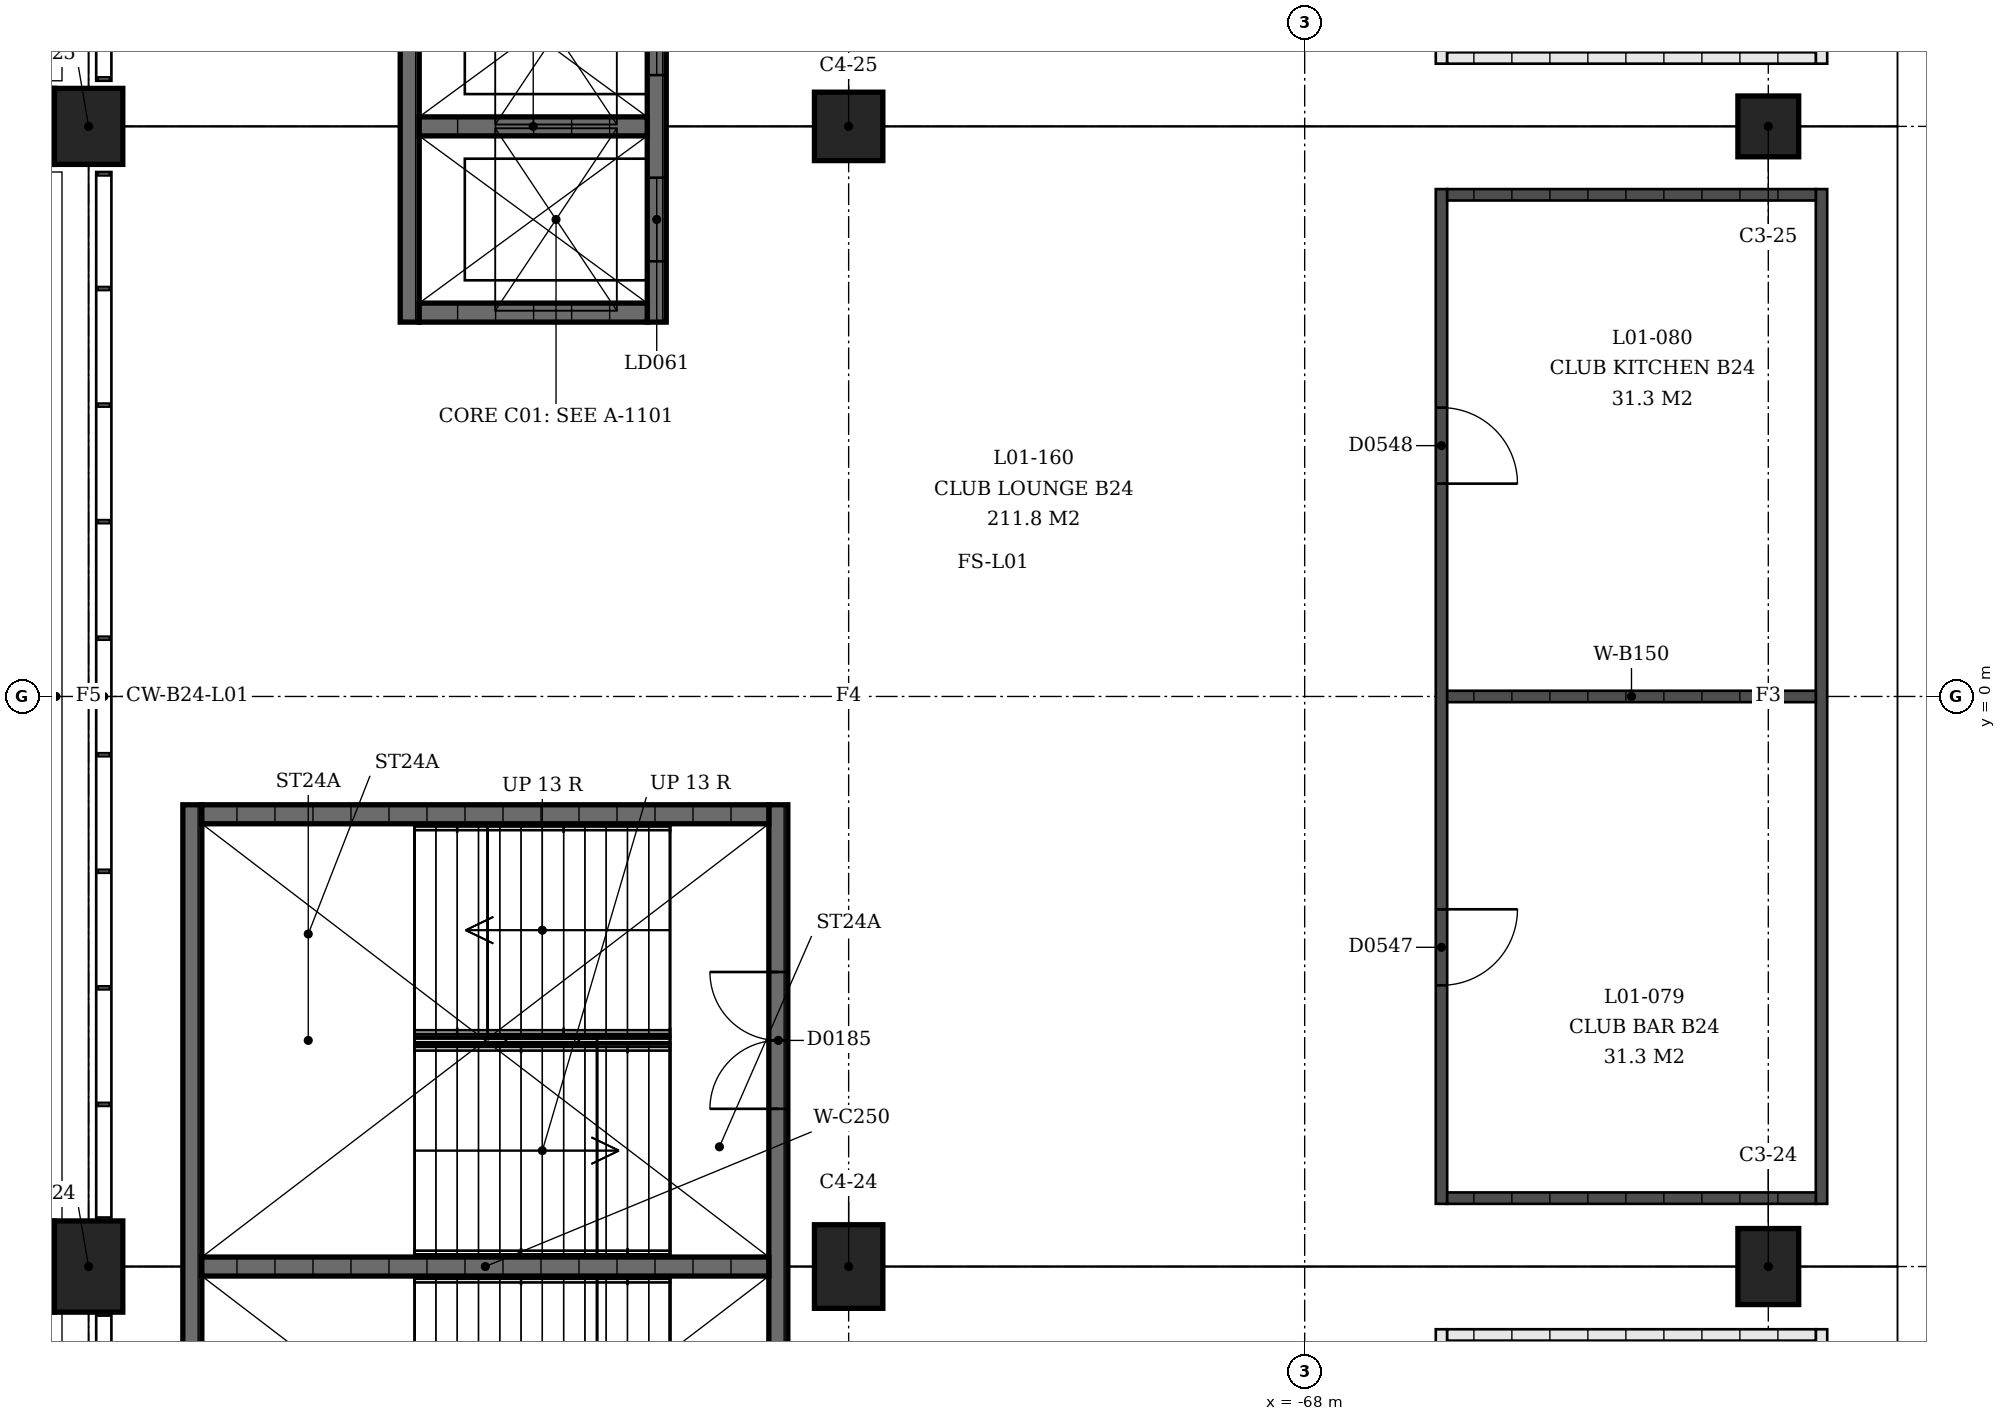
"""IFC4 building model, lengths in metres.
Left out: names, types, materials, properties, quantities, classifications, styles, units other than length and angle.
Written with IfcOpenShell. Run it as: python <this file> out.ifc"""

import sys

from ifc_helpers import new_model, si_unit, direction, frame, frame_2d, origin, origin_2d, place, context, subcontext, project, spatial, rectangle, extrude, element, fill, save


model = new_model("IFC4")
c1 = context("Model", 3, precision=1e-05, world=origin(), true_north=direction((0.0, 1.0)))
c2 = subcontext(c1, "Body", "Model", "MODEL_VIEW")
j1 = project(units=[si_unit("LENGTHUNIT", "METRE"), si_unit("PLANEANGLEUNIT", "RADIAN")], contexts=[c1])
p1 = place(None, origin())
s1 = spatial("IfcSite", under=j1, at=p1, CompositionType="ELEMENT")
p2 = place(p1, origin())
s2 = spatial("IfcBuilding", under=s1, at=p2, CompositionType="ELEMENT")
p3 = place(p2, frame((0.0, 0.0, 4.5)))
s3 = spatial("IfcBuildingStorey", under=s2, at=p3, CompositionType="ELEMENT", Elevation=4.5)
p4 = place(p3, frame((-61.9, -7.5, 0.0), z_axis=(0.0, 0.0, 1.0), x_axis=(0.0, -1.0, 0.0)))
e1 = element("IfcColumn", 1, at=p4, inside=s3, PredefinedType="COLUMN", context=c2, shape_type="SweptSolid", body=[
    extrude(rectangle(XDim=1.0, YDim=0.8, at=origin_2d()), origin(), (0.0, 0.0, 1.0), 4.5),
])
p5 = place(p3, frame((-74.0, -7.5, 0.0), z_axis=(0.0, 0.0, 1.0), x_axis=(0.0, -1.0, 0.0)))
e2 = element("IfcColumn", 2, at=p5, inside=s3, PredefinedType="COLUMN", context=c2, shape_type="SweptSolid", body=[
    extrude(rectangle(XDim=1.1, YDim=0.9, at=origin_2d()), origin(), (0.0, 0.0, 1.0), 4.5),
])
p6 = place(p3, frame((-84.0, -7.5, 0.0), z_axis=(0.0, 0.0, 1.0), x_axis=(0.0, -1.0, 0.0)))
e3 = element("IfcColumn", 3, at=p6, inside=s3, PredefinedType="COLUMN", context=c2, shape_type="SweptSolid", body=[
    extrude(rectangle(XDim=1.2, YDim=0.9, at=origin_2d()), origin(), (0.0, 0.0, 1.0), 4.5),
])
p7 = place(p3, frame((-61.9, 7.5, 0.0), z_axis=(0.0, 0.0, 1.0), x_axis=(0.0, -1.0, 0.0)))
e4 = element("IfcColumn", 4, at=p7, inside=s3, PredefinedType="COLUMN", context=c2, shape_type="SweptSolid", body=[
    extrude(rectangle(XDim=0.8, YDim=0.8, at=origin_2d()), origin(), (0.0, 0.0, 1.0), 4.5),
])
p8 = place(p3, frame((-74.0, 7.5, 0.0), z_axis=(0.0, 0.0, 1.0), x_axis=(0.0, -1.0, 0.0)))
e5 = element("IfcColumn", 5, at=p8, inside=s3, PredefinedType="COLUMN", context=c2, shape_type="SweptSolid", body=[
    extrude(rectangle(XDim=0.9, YDim=0.9, at=origin_2d()), origin(), (0.0, 0.0, 1.0), 4.5),
])
p9 = place(p3, frame((-84.0, 7.5, 0.0), z_axis=(0.0, 0.0, 1.0), x_axis=(0.0, -1.0, 0.0)))
e6 = element("IfcColumn", 6, at=p9, inside=s3, PredefinedType="COLUMN", context=c2, shape_type="SweptSolid", body=[
    extrude(rectangle(XDim=1.0, YDim=0.9, at=origin_2d()), origin(), (0.0, 0.0, 1.0), 4.5),
])
p10 = place(p3, frame((-74.925, -1.425, 0.0), z_axis=(0.0, 0.0, 1.0), x_axis=(0.0, -1.0, 0.0)))
e7 = element("IfcWall", 7, at=p10, inside=s3, PredefinedType="SHEAR", context=c2, shape_type="SweptSolid", body=[
    extrude(rectangle(XDim=12.15, YDim=0.25, at=frame_2d((6.075, 0.0))), origin(), (0.0, 0.0, 1.0), 4.09),
])
p11 = place(p10, frame((2.2, 0.0, 0.0)))
e8 = element("IfcOpeningElement", 8, at=p11, cuts=e7, PredefinedType="OPENING", context=c2, shape_type="SweptSolid", body=[
    extrude(rectangle(XDim=1.8, YDim=2.1, at=frame_2d((0.9, 1.05))), frame((0.0, 0.125, 0.0), z_axis=(0.0, -1.0, 0.0), x_axis=(1.0, 0.0, 0.0)), (0.0, 0.0, 1.0), 0.25),
])
p12 = place(p10, frame((8.15, 0.0, 0.0)))
e9 = element("IfcOpeningElement", 9, at=p12, cuts=e7, PredefinedType="OPENING", context=c2, shape_type="SweptSolid", body=[
    extrude(rectangle(XDim=1.8, YDim=2.1, at=frame_2d((0.9, 1.05))), frame((0.0, 0.125, 0.0), z_axis=(0.0, -1.0, 0.0), x_axis=(1.0, 0.0, 0.0)), (0.0, 0.0, 1.0), 0.25),
])
p13 = place(p3, frame((-82.635, -1.425, 0.0), z_axis=(0.0, 0.0, 1.0), x_axis=(0.0, -1.0, 0.0)))
e10 = element("IfcWall", 10, at=p13, inside=s3, PredefinedType="SHEAR", context=c2, shape_type="SweptSolid", body=[
    extrude(rectangle(XDim=12.15, YDim=0.25, at=frame_2d((6.075, 0.0))), origin(), (0.0, 0.0, 1.0), 4.09),
])
for number, where, z_axis, x_axis in (
    (11, (-75.05, -1.55, 0.0), (0.0, 0.0, 1.0), (-1.0, 0.0, 0.0)),
    (12, (-75.05, -7.5, 0.0), (0.0, 0.0, 1.0), (-1.0, 0.0, 0.0)),
):
    element("IfcWall", number, at=place(p3, frame(where, z_axis=z_axis, x_axis=x_axis)), inside=s3, PredefinedType="SHEAR", context=c2, shape_type="SweptSolid", body=[
        extrude(rectangle(XDim=7.46, YDim=0.25, at=frame_2d((3.73, 0.0))), origin(), (0.0, 0.0, 1.0), 4.09),
    ])
p14 = place(p3, frame((-76.525, 10.075, 0.0), z_axis=(0.0, 0.0, 1.0), x_axis=(0.0, -1.0, 0.0)))
e13 = element("IfcWall", 13, at=p14, inside=s3, PredefinedType="SHEAR", context=c2, shape_type="SweptSolid", body=[
    extrude(rectangle(XDim=5.15, YDim=0.25, at=frame_2d((2.575, 0.0))), origin(), (0.0, 0.0, 1.0), 4.09),
])
p15 = place(p14, frame((0.8, 0.0, 0.0)))
e14 = element("IfcOpeningElement", 14, at=p15, cuts=e13, PredefinedType="OPENING", context=c2, shape_type="SweptSolid", body=[
    extrude(rectangle(XDim=1.1, YDim=2.1, at=frame_2d((0.55, 1.05))), frame((0.0, 0.125, 0.0), z_axis=(0.0, -1.0, 0.0), x_axis=(1.0, 0.0, 0.0)), (0.0, 0.0, 1.0), 0.25),
])
p16 = place(p14, frame((3.25, 0.0, 0.0)))
e15 = element("IfcOpeningElement", 15, at=p16, cuts=e13, PredefinedType="OPENING", context=c2, shape_type="SweptSolid", body=[
    extrude(rectangle(XDim=1.1, YDim=2.1, at=frame_2d((0.55, 1.05))), frame((0.0, 0.125, 0.0), z_axis=(0.0, -1.0, 0.0), x_axis=(1.0, 0.0, 0.0)), (0.0, 0.0, 1.0), 0.25),
])
p17 = place(p3, frame((-79.775, 10.075, 0.0), z_axis=(0.0, 0.0, 1.0), x_axis=(0.0, -1.0, 0.0)))
e16 = element("IfcWall", 16, at=p17, inside=s3, PredefinedType="SHEAR", context=c2, shape_type="SweptSolid", body=[
    extrude(rectangle(XDim=5.15, YDim=0.25, at=frame_2d((2.575, 0.0))), origin(), (0.0, 0.0, 1.0), 4.09),
])
for number, where, z_axis, x_axis in (
    (17, (-76.65, 5.05, 0.0), (0.0, 0.0, 1.0), (-1.0, 0.0, 0.0)),
    (18, (-76.65, 7.5, 0.0), (0.0, 0.0, 1.0), (-1.0, 0.0, 0.0)),
):
    element("IfcWall", number, at=place(p3, frame(where, z_axis=z_axis, x_axis=x_axis)), inside=s3, PredefinedType="SHEAR", context=c2, shape_type="SweptSolid", body=[
        extrude(rectangle(XDim=3.0, YDim=0.25, at=frame_2d((1.5, 0.0))), origin(), (0.0, 0.0, 1.0), 4.09),
    ])
p18 = place(p3, frame((-61.2, -8.325, 0.0), z_axis=(0.0, 0.0, 1.0), x_axis=(0.0, -1.0, 0.0)))
e19 = element("IfcWall", 19, at=p18, inside=s3, PredefinedType="PARTITIONING", context=c2, shape_type="SweptSolid", body=[
    extrude(rectangle(XDim=13.35, YDim=0.15, at=frame_2d((6.675, 0.0))), origin(), (0.0, 0.0, 1.0), 3.0),
])
p19 = place(p3, frame((-66.2, -8.325, 0.0), z_axis=(0.0, 0.0, 1.0), x_axis=(0.0, -1.0, 0.0)))
e20 = element("IfcWall", 20, at=p19, inside=s3, PredefinedType="PARTITIONING", context=c2, shape_type="SweptSolid", body=[
    extrude(rectangle(XDim=13.35, YDim=0.15, at=frame_2d((6.675, 0.0))), origin(), (0.0, 0.0, 1.0), 3.0),
])
p20 = place(p19, frame((1.671, 0.0, 0.0)))
e21 = element("IfcOpeningElement", 21, at=p20, cuts=e20, PredefinedType="OPENING", context=c2, shape_type="SweptSolid", body=[
    extrude(rectangle(XDim=0.9, YDim=2.1, at=frame_2d((0.45, 1.05))), frame((0.0, 0.075, 0.0), z_axis=(0.0, -1.0, 0.0), x_axis=(1.0, 0.0, 0.0)), (0.0, 0.0, 1.0), 0.15),
])
p21 = place(p19, frame((5.763, 0.0, 0.0)))
e22 = element("IfcOpeningElement", 22, at=p21, cuts=e20, PredefinedType="OPENING", context=c2, shape_type="SweptSolid", body=[
    extrude(rectangle(XDim=0.9, YDim=2.1, at=frame_2d((0.45, 1.05))), frame((0.0, 0.075, 0.0), z_axis=(0.0, -1.0, 0.0), x_axis=(1.0, 0.0, 0.0)), (0.0, 0.0, 1.0), 0.15),
])
p22 = place(p19, frame((8.963, 0.0, 0.0)))
e23 = element("IfcOpeningElement", 23, at=p22, cuts=e20, PredefinedType="OPENING", context=c2, shape_type="SweptSolid", body=[
    extrude(rectangle(XDim=1.1, YDim=2.1, at=frame_2d((0.55, 1.05))), frame((0.0, 0.075, 0.0), z_axis=(0.0, -1.0, 0.0), x_axis=(1.0, 0.0, 0.0)), (0.0, 0.0, 1.0), 0.15),
])
p23 = place(p19, frame((11.471, 0.0, 0.0)))
e24 = element("IfcOpeningElement", 24, at=p23, cuts=e20, PredefinedType="OPENING", context=c2, shape_type="SweptSolid", body=[
    extrude(rectangle(XDim=1.1, YDim=2.1, at=frame_2d((0.55, 1.05))), frame((0.0, 0.075, 0.0), z_axis=(0.0, -1.0, 0.0), x_axis=(1.0, 0.0, 0.0)), (0.0, 0.0, 1.0), 0.15),
])
p24 = place(p3, frame((-61.275, -8.4, 0.0), z_axis=(0.0, 0.0, 1.0), x_axis=(-1.0, 0.0, 0.0)))
e25 = element("IfcWall", 25, at=p24, inside=s3, PredefinedType="PARTITIONING", context=c2, shape_type="SweptSolid", body=[
    extrude(rectangle(XDim=4.85, YDim=0.15, at=frame_2d((2.425, 0.0))), origin(), (0.0, 0.0, 1.0), 3.0),
])
p25 = place(p3, frame((-61.2, -6.675, 0.0), z_axis=(0.0, 0.0, 1.0), x_axis=(0.0, 1.0, 0.0)))
e26 = element("IfcWall", 26, at=p25, inside=s3, PredefinedType="SOLIDWALL", context=c2, shape_type="SweptSolid", body=[
    extrude(rectangle(XDim=13.35, YDim=0.15, at=frame_2d((6.675, 0.0))), origin(), (0.0, 0.0, 1.0), 3.0),
])
p26 = place(p3, frame((-66.2, -6.675, 0.0), z_axis=(0.0, 0.0, 1.0), x_axis=(0.0, 1.0, 0.0)))
e27 = element("IfcWall", 27, at=p26, inside=s3, PredefinedType="SOLIDWALL", context=c2, shape_type="SweptSolid", body=[
    extrude(rectangle(XDim=13.35, YDim=0.15, at=frame_2d((6.675, 0.0))), origin(), (0.0, 0.0, 1.0), 3.0),
])
p27 = place(p26, frame((2.875, 0.0, 0.0)))
e28 = element("IfcOpeningElement", 28, at=p27, cuts=e27, PredefinedType="OPENING", context=c2, shape_type="SweptSolid", body=[
    extrude(rectangle(XDim=1.0, YDim=2.1, at=frame_2d((0.5, 1.05))), frame((0.0, 0.075, 0.0), z_axis=(0.0, -1.0, 0.0), x_axis=(1.0, 0.0, 0.0)), (0.0, 0.0, 1.0), 0.15),
])
p28 = place(p26, frame((9.475, 0.0, 0.0)))
e29 = element("IfcOpeningElement", 29, at=p28, cuts=e27, PredefinedType="OPENING", context=c2, shape_type="SweptSolid", body=[
    extrude(rectangle(XDim=1.0, YDim=2.1, at=frame_2d((0.5, 1.05))), frame((0.0, 0.075, 0.0), z_axis=(0.0, -1.0, 0.0), x_axis=(1.0, 0.0, 0.0)), (0.0, 0.0, 1.0), 0.15),
])
for number, where, z_axis, x_axis in (
    (30, (-61.275, -6.6, 0.0), (0.0, 0.0, 1.0), (-1.0, 0.0, 0.0)),
    (31, (-61.275, 0.0, 0.0), (0.0, 0.0, 1.0), (-1.0, 0.0, 0.0)),
    (32, (-61.275, 6.6, 0.0), (0.0, 0.0, 1.0), (-1.0, 0.0, 0.0)),
):
    element("IfcWall", number, at=place(p3, frame(where, z_axis=z_axis, x_axis=x_axis)), inside=s3, PredefinedType="SOLIDWALL", context=c2, shape_type="SweptSolid", body=[
        extrude(rectangle(XDim=4.85, YDim=0.15, at=frame_2d((2.425, 0.0))), origin(), (0.0, 0.0, 1.0), 3.0),
    ])
p29 = place(p3, frame((-61.2, 21.675, 0.0), z_axis=(0.0, 0.0, 1.0), x_axis=(0.0, -1.0, 0.0)))
e33 = element("IfcWall", 33, at=p29, inside=s3, PredefinedType="PARTITIONING", context=c2, shape_type="SweptSolid", body=[
    extrude(rectangle(XDim=13.35, YDim=0.15, at=frame_2d((6.675, 0.0))), origin(), (0.0, 0.0, 1.0), 3.0),
])
p30 = place(p3, frame((-66.2, 21.675, 0.0), z_axis=(0.0, 0.0, 1.0), x_axis=(0.0, -1.0, 0.0)))
e34 = element("IfcWall", 34, at=p30, inside=s3, PredefinedType="PARTITIONING", context=c2, shape_type="SweptSolid", body=[
    extrude(rectangle(XDim=13.35, YDim=0.15, at=frame_2d((6.675, 0.0))), origin(), (0.0, 0.0, 1.0), 3.0),
])
p31 = place(p30, frame((1.671, 0.0, 0.0)))
e35 = element("IfcOpeningElement", 35, at=p31, cuts=e34, PredefinedType="OPENING", context=c2, shape_type="SweptSolid", body=[
    extrude(rectangle(XDim=0.9, YDim=2.1, at=frame_2d((0.45, 1.05))), frame((0.0, 0.075, 0.0), z_axis=(0.0, -1.0, 0.0), x_axis=(1.0, 0.0, 0.0)), (0.0, 0.0, 1.0), 0.15),
])
p32 = place(p30, frame((5.763, 0.0, 0.0)))
e36 = element("IfcOpeningElement", 36, at=p32, cuts=e34, PredefinedType="OPENING", context=c2, shape_type="SweptSolid", body=[
    extrude(rectangle(XDim=0.9, YDim=2.1, at=frame_2d((0.45, 1.05))), frame((0.0, 0.075, 0.0), z_axis=(0.0, -1.0, 0.0), x_axis=(1.0, 0.0, 0.0)), (0.0, 0.0, 1.0), 0.15),
])
p33 = place(p30, frame((8.963, 0.0, 0.0)))
e37 = element("IfcOpeningElement", 37, at=p33, cuts=e34, PredefinedType="OPENING", context=c2, shape_type="SweptSolid", body=[
    extrude(rectangle(XDim=1.1, YDim=2.1, at=frame_2d((0.55, 1.05))), frame((0.0, 0.075, 0.0), z_axis=(0.0, -1.0, 0.0), x_axis=(1.0, 0.0, 0.0)), (0.0, 0.0, 1.0), 0.15),
])
p34 = place(p30, frame((11.471, 0.0, 0.0)))
e38 = element("IfcOpeningElement", 38, at=p34, cuts=e34, PredefinedType="OPENING", context=c2, shape_type="SweptSolid", body=[
    extrude(rectangle(XDim=1.1, YDim=2.1, at=frame_2d((0.55, 1.05))), frame((0.0, 0.075, 0.0), z_axis=(0.0, -1.0, 0.0), x_axis=(1.0, 0.0, 0.0)), (0.0, 0.0, 1.0), 0.15),
])
p35 = place(p3, frame((-61.275, 8.4, 0.0), z_axis=(0.0, 0.0, 1.0), x_axis=(-1.0, 0.0, 0.0)))
e39 = element("IfcWall", 39, at=p35, inside=s3, PredefinedType="PARTITIONING", context=c2, shape_type="SweptSolid", body=[
    extrude(rectangle(XDim=4.85, YDim=0.15, at=frame_2d((2.425, 0.0))), origin(), (0.0, 0.0, 1.0), 3.0),
])
p36 = place(p11, origin())
e40 = element("IfcDoor", 40, at=p36, inside=s3, OperationType="DOUBLE_DOOR_SINGLE_SWING", PredefinedType="DOOR", context=c2, shape_type="SweptSolid", body=[
    extrude(rectangle(XDim=1.8, YDim=2.1, at=frame_2d((0.9, 1.05))), frame((0.0, 0.025, 0.0), z_axis=(0.0, -1.0, 0.0), x_axis=(1.0, 0.0, 0.0)), (0.0, 0.0, 1.0), 0.05),
])
fill(e8, e40)
p37 = place(p15, origin())
e41 = element("IfcDoor", 41, at=p37, inside=s3, OperationType="SLIDING_TO_LEFT", PredefinedType="DOOR", context=c2, shape_type="SweptSolid", body=[
    extrude(rectangle(XDim=1.1, YDim=2.1, at=frame_2d((0.55, 1.05))), frame((0.0, 0.025, 0.0), z_axis=(0.0, -1.0, 0.0), x_axis=(1.0, 0.0, 0.0)), (0.0, 0.0, 1.0), 0.05),
])
fill(e14, e41)
p38 = place(p16, origin())
e42 = element("IfcDoor", 42, at=p38, inside=s3, OperationType="SLIDING_TO_LEFT", PredefinedType="DOOR", context=c2, shape_type="SweptSolid", body=[
    extrude(rectangle(XDim=1.1, YDim=2.1, at=frame_2d((0.55, 1.05))), frame((0.0, 0.025, 0.0), z_axis=(0.0, -1.0, 0.0), x_axis=(1.0, 0.0, 0.0)), (0.0, 0.0, 1.0), 0.05),
])
fill(e15, e42)
p39 = place(p27, origin())
e43 = element("IfcDoor", 43, at=p39, inside=s3, OperationType="SINGLE_SWING_RIGHT", PredefinedType="DOOR", context=c2, shape_type="SweptSolid", body=[
    extrude(rectangle(XDim=1.0, YDim=2.1, at=frame_2d((0.5, 1.05))), frame((0.0, 0.025, 0.0), z_axis=(0.0, -1.0, 0.0), x_axis=(1.0, 0.0, 0.0)), (0.0, 0.0, 1.0), 0.05),
])
fill(e28, e43)
p40 = place(p28, origin())
e44 = element("IfcDoor", 44, at=p40, inside=s3, OperationType="SINGLE_SWING_LEFT", PredefinedType="DOOR", context=c2, shape_type="SweptSolid", body=[
    extrude(rectangle(XDim=1.0, YDim=2.1, at=frame_2d((0.5, 1.05))), frame((0.0, 0.025, 0.0), z_axis=(0.0, -1.0, 0.0), x_axis=(1.0, 0.0, 0.0)), (0.0, 0.0, 1.0), 0.05),
])
fill(e29, e44)
save(model, sys.argv[1])
